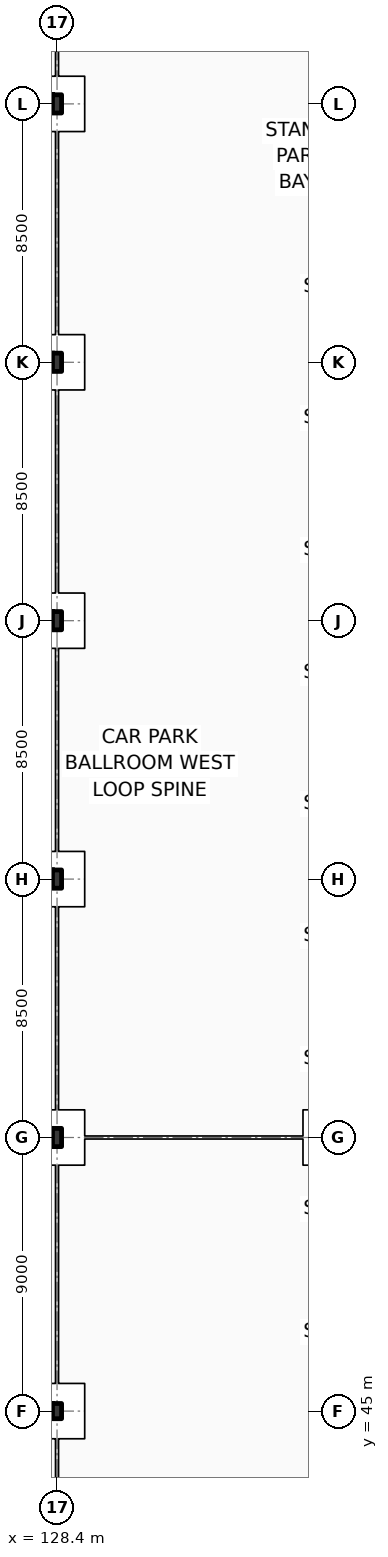
"""IFC4 building model, lengths in metres.
Left out: names, types, materials, properties, quantities, classifications, styles, units other than length and angle.
Written with IfcOpenShell. Run it as: python <this file> out.ifc"""

import sys

from ifc_helpers import new_model, si_unit, direction, frame, origin, origin_2d, place, context, subcontext, project, spatial, i_section, extrude, element, save


model = new_model("IFC4")
c1 = context("Model", 3, precision=1e-05, world=origin(), true_north=direction((0.0, 1.0)))
c2 = subcontext(c1, "Body", "Model", "MODEL_VIEW")
j1 = project(units=[si_unit("LENGTHUNIT", "METRE"), si_unit("PLANEANGLEUNIT", "RADIAN")], contexts=[c1])
p1 = place(None, origin())
s1 = spatial("IfcSite", under=j1, at=p1, CompositionType="ELEMENT")
p2 = place(p1, origin())
s2 = spatial("IfcBuilding", under=s1, at=p2, CompositionType="ELEMENT")
p3 = place(p2, frame((0.0, 0.0, -4.5)))
s3 = spatial("IfcBuildingStorey", under=s2, at=p3, CompositionType="ELEMENT", Elevation=-4.5)
for number, where, z_axis, x_axis in (
    (1, (128.4, 54.0, 0.0), (0.0, 0.0, 1.0), (1.0, 0.0, 0.0)),
    (2, (128.4, 62.5, 0.0), (0.0, 0.0, 1.0), (1.0, 0.0, 0.0)),
    (3, (128.4, 71.0, 0.0), (0.0, 0.0, 1.0), (1.0, 0.0, 0.0)),
    (4, (128.4, 79.5, 0.0), (0.0, 0.0, 1.0), (1.0, 0.0, 0.0)),
    (5, (128.4, 88.0, 0.0), (0.0, 0.0, 1.0), (1.0, 0.0, 0.0)),
):
    element("IfcColumn", number, at=place(p3, frame(where, z_axis=z_axis, x_axis=x_axis)), inside=s3, PredefinedType="COLUMN", context=c2, shape_type="SweptSolid", body=[
        extrude(i_section(OverallWidth=0.3, OverallDepth=0.6, WebThickness=0.015, FlangeThickness=0.03, FilletRadius=0.027, at=origin_2d()), origin(), (0.0, 0.0, 1.0), 4.5),
    ])
p4 = place(p3, frame((128.4, 45.0, 0.0), z_axis=(0.0, 0.0, 1.0), x_axis=(1.0, 0.0, 0.0)))
e6 = element("IfcColumn", 6, at=p4, inside=s3, PredefinedType="COLUMN", context=c2, shape_type="SweptSolid", body=[
    extrude(i_section(OverallWidth=0.3, OverallDepth=0.5, WebThickness=0.014, FlangeThickness=0.028, FilletRadius=0.027, at=origin_2d()), origin(), (0.0, 0.0, 1.0), 4.5),
])
save(model, sys.argv[1])
